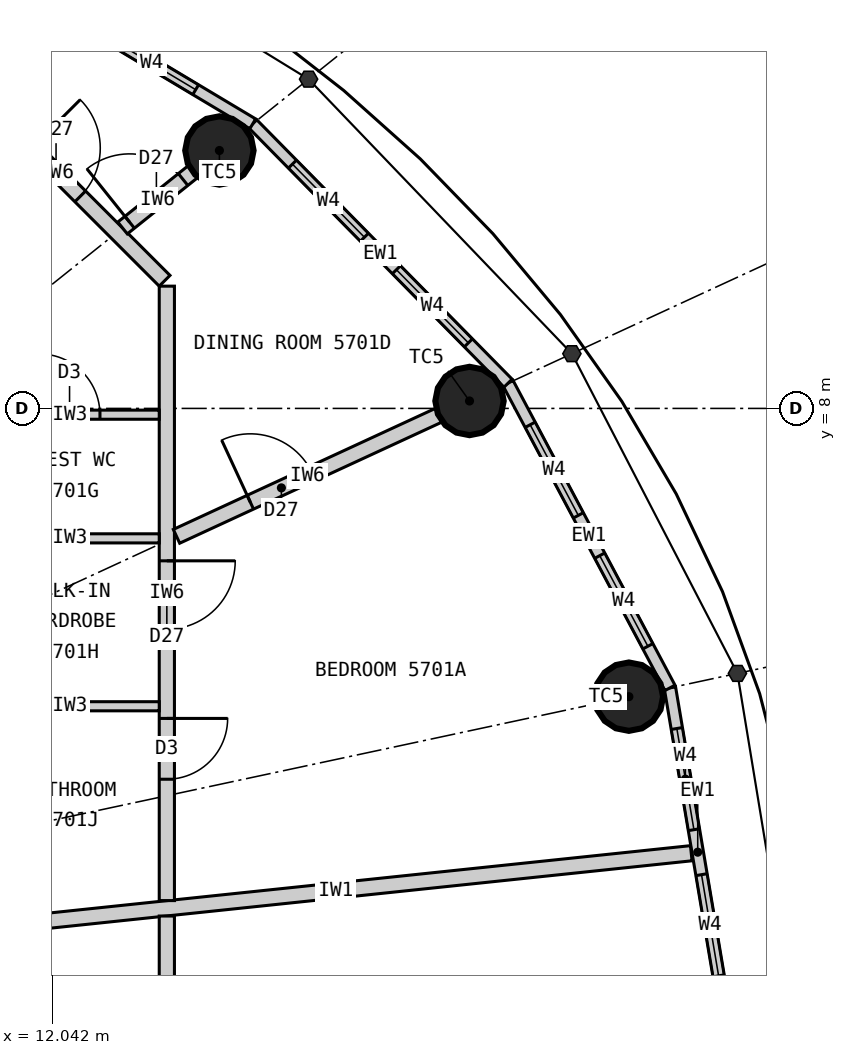
"""IFC4 building model, lengths in metres.
Left out: names, types, materials, properties, quantities, classifications, styles, units other than length and angle.
Written with IfcOpenShell. Run it as: python <this file> out.ifc"""

import sys

from ifc_helpers import new_model, si_unit, direction, frame, frame_2d, origin, origin_2d, place, context, subcontext, project, spatial, rectangle, circle, extrude, element, fill, save


model = new_model("IFC4")
c1 = context("Model", 3, precision=1e-05, world=origin(), true_north=direction((0.0, 1.0)))
c2 = subcontext(c1, "Body", "Model", "MODEL_VIEW")
j1 = project(units=[si_unit("LENGTHUNIT", "METRE"), si_unit("PLANEANGLEUNIT", "RADIAN")], contexts=[c1])
p1 = place(None, origin())
s1 = spatial("IfcSite", under=j1, at=p1, CompositionType="ELEMENT")
p2 = place(p1, origin())
s2 = spatial("IfcBuilding", under=s1, at=p2, CompositionType="ELEMENT")
p3 = place(p2, frame((0.0, 0.0, 212.7)))
s3 = spatial("IfcBuildingStorey", under=s2, at=p3, CompositionType="ELEMENT", Elevation=212.7)
for number, where, z_axis, x_axis in (
    (1, (19.629, 4.208, 0.0), (0.0, 0.0, 1.0), (1.0, 0.0, 0.0)),
    (2, (17.532, 8.098, 0.0), (0.0, 0.0, 1.0), (1.0, 0.0, 0.0)),
    (3, (14.241, 11.393, 0.0), (0.0, 0.0, 1.0), (1.0, 0.0, 0.0)),
):
    element("IfcColumn", number, at=place(p3, frame(where, z_axis=z_axis, x_axis=x_axis)), inside=s3, PredefinedType="COLUMN", context=c2, shape_type="SweptSolid", body=[
        extrude(circle(Radius=0.45, at=origin_2d()), origin(), (0.0, 0.0, 1.0), 3.3),
    ])
p4 = place(p3, frame((20.9, 0.0, 0.0), z_axis=(0.0, 0.0, 1.0), x_axis=(-0.166538513568, 0.986034950445, 0.0)))
e4 = element("IfcWall", 4, at=p4, inside=s3, PredefinedType="ELEMENTEDWALL", context=c2, shape_type="SweptSolid", body=[
    extrude(rectangle(XDim=4.385, YDim=0.15, at=frame_2d((2.192, 0.0))), origin(), (0.0, 0.0, 1.0), 3.12),
])
p5 = place(p4, frame((0.542, 0.0, 0.9)))
e5 = element("IfcOpeningElement", 5, at=p5, cuts=e4, PredefinedType="OPENING", context=c2, shape_type="SweptSolid", body=[
    extrude(rectangle(XDim=1.35, YDim=1.9, at=frame_2d((0.675, 0.95))), frame((0.0, 0.085, 0.0), z_axis=(0.0, -1.0, 0.0), x_axis=(1.0, 0.0, 0.0)), (0.0, 0.0, 1.0), 0.17),
])
p6 = place(p4, frame((2.492, 0.0, 0.9)))
e6 = element("IfcOpeningElement", 6, at=p6, cuts=e4, PredefinedType="OPENING", context=c2, shape_type="SweptSolid", body=[
    extrude(rectangle(XDim=1.35, YDim=1.9, at=frame_2d((0.675, 0.95))), frame((0.0, 0.085, 0.0), z_axis=(0.0, -1.0, 0.0), x_axis=(1.0, 0.0, 0.0)), (0.0, 0.0, 1.0), 0.17),
])
p7 = place(p3, frame((20.17, 4.323, 0.0), z_axis=(0.0, 0.0, 1.0), x_axis=(-0.469256152955, 0.883062094597, 0.0)))
e7 = element("IfcWall", 7, at=p7, inside=s3, PredefinedType="ELEMENTEDWALL", context=c2, shape_type="SweptSolid", body=[
    extrude(rectangle(XDim=4.539, YDim=0.15, at=frame_2d((2.27, 0.0))), origin(), (0.0, 0.0, 1.0), 3.12),
])
p8 = place(p7, frame((0.62, 0.0, 0.9)))
e8 = element("IfcOpeningElement", 8, at=p8, cuts=e7, PredefinedType="OPENING", context=c2, shape_type="SweptSolid", body=[
    extrude(rectangle(XDim=1.35, YDim=1.9, at=frame_2d((0.675, 0.95))), frame((0.0, 0.085, 0.0), z_axis=(0.0, -1.0, 0.0), x_axis=(1.0, 0.0, 0.0)), (0.0, 0.0, 1.0), 0.17),
])
p9 = place(p7, frame((2.57, 0.0, 0.9)))
e9 = element("IfcOpeningElement", 9, at=p9, cuts=e7, PredefinedType="OPENING", context=c2, shape_type="SweptSolid", body=[
    extrude(rectangle(XDim=1.35, YDim=1.9, at=frame_2d((0.675, 0.95))), frame((0.0, 0.085, 0.0), z_axis=(0.0, -1.0, 0.0), x_axis=(1.0, 0.0, 0.0)), (0.0, 0.0, 1.0), 0.17),
])
p10 = place(p3, frame((18.04, 8.332, 0.0), z_axis=(0.0, 0.0, 1.0), x_axis=(-0.701527379618, 0.712642501993, 0.0)))
e10 = element("IfcWall", 10, at=p10, inside=s3, PredefinedType="ELEMENTEDWALL", context=c2, shape_type="SweptSolid", body=[
    extrude(rectangle(XDim=4.788, YDim=0.15, at=frame_2d((2.394, 0.0))), origin(), (0.0, 0.0, 1.0), 3.12),
])
p11 = place(p10, frame((0.744, 0.0, 0.9)))
e11 = element("IfcOpeningElement", 11, at=p11, cuts=e10, PredefinedType="OPENING", context=c2, shape_type="SweptSolid", body=[
    extrude(rectangle(XDim=1.35, YDim=1.9, at=frame_2d((0.675, 0.95))), frame((0.0, 0.085, 0.0), z_axis=(0.0, -1.0, 0.0), x_axis=(1.0, 0.0, 0.0)), (0.0, 0.0, 1.0), 0.17),
])
p12 = place(p10, frame((2.694, 0.0, 0.9)))
e12 = element("IfcOpeningElement", 12, at=p12, cuts=e10, PredefinedType="OPENING", context=c2, shape_type="SweptSolid", body=[
    extrude(rectangle(XDim=1.35, YDim=1.9, at=frame_2d((0.675, 0.95))), frame((0.0, 0.085, 0.0), z_axis=(0.0, -1.0, 0.0), x_axis=(1.0, 0.0, 0.0)), (0.0, 0.0, 1.0), 0.17),
])
p13 = place(p3, frame((14.68, 11.744, 0.0), z_axis=(0.0, 0.0, 1.0), x_axis=(-0.85822150553, 0.513279502265, 0.0)))
e13 = element("IfcWall", 13, at=p13, inside=s3, PredefinedType="ELEMENTEDWALL", context=c2, shape_type="SweptSolid", body=[
    extrude(rectangle(XDim=5.05, YDim=0.15, at=frame_2d((2.525, 0.0))), origin(), (0.0, 0.0, 1.0), 3.12),
])
p14 = place(p13, frame((0.875, 0.0, 0.9)))
e14 = element("IfcOpeningElement", 14, at=p14, cuts=e13, PredefinedType="OPENING", context=c2, shape_type="SweptSolid", body=[
    extrude(rectangle(XDim=1.35, YDim=1.9, at=frame_2d((0.675, 0.95))), frame((0.0, 0.085, 0.0), z_axis=(0.0, -1.0, 0.0), x_axis=(1.0, 0.0, 0.0)), (0.0, 0.0, 1.0), 0.17),
])
p15 = place(p13, frame((2.825, 0.0, 0.9)))
e15 = element("IfcOpeningElement", 15, at=p15, cuts=e13, PredefinedType="OPENING", context=c2, shape_type="SweptSolid", body=[
    extrude(rectangle(XDim=1.35, YDim=1.9, at=frame_2d((0.675, 0.95))), frame((0.0, 0.085, 0.0), z_axis=(0.0, -1.0, 0.0), x_axis=(1.0, 0.0, 0.0)), (0.0, 0.0, 1.0), 0.17),
])
p16 = place(p3, frame((11.1, 1.166, 0.0), z_axis=(0.0, 0.0, 1.0), x_axis=(0.994527487125, 0.104475247564, 0.0)))
e16 = element("IfcWall", 16, at=p16, inside=s3, PredefinedType="PARTITIONING", context=c2, shape_type="SweptSolid", body=[
    extrude(rectangle(XDim=9.401, YDim=0.2, at=frame_2d((4.701, 0.0))), origin(), (0.0, 0.0, 1.0), 2.47),
])
p17 = place(p3, frame((13.55, 1.525, 0.0), z_axis=(0.0, 0.0, 1.0), x_axis=(0.0, 1.0, 0.0)))
e17 = element("IfcWall", 17, at=p17, inside=s3, PredefinedType="PARTITIONING", context=c2, shape_type="SweptSolid", body=[
    extrude(rectangle(XDim=8.084, YDim=0.2, at=frame_2d((4.042, 0.0))), origin(), (0.0, 0.0, 1.0), 3.12),
])
p18 = place(p17, frame((1.597, 0.0, 0.0)))
e18 = element("IfcOpeningElement", 18, at=p18, cuts=e17, PredefinedType="OPENING", context=c2, shape_type="SweptSolid", body=[
    extrude(rectangle(XDim=0.8, YDim=2.1, at=frame_2d((0.4, 1.05))), frame((0.0, 0.11, 0.0), z_axis=(0.0, -1.0, 0.0), x_axis=(1.0, 0.0, 0.0)), (0.0, 0.0, 1.0), 0.22),
])
p19 = place(p17, frame((3.57, 0.0, 0.0)))
e19 = element("IfcOpeningElement", 19, at=p19, cuts=e17, PredefinedType="OPENING", context=c2, shape_type="SweptSolid", body=[
    extrude(rectangle(XDim=0.9, YDim=2.1, at=frame_2d((0.45, 1.05))), frame((0.0, 0.11, 0.0), z_axis=(0.0, -1.0, 0.0), x_axis=(1.0, 0.0, 0.0)), (0.0, 0.0, 1.0), 0.22),
])
p20 = place(p3, frame((13.521, 9.679, 0.0), z_axis=(0.0, 0.0, 1.0), x_axis=(-0.707106781187, 0.707106781187, 0.0)))
e20 = element("IfcWall", 20, at=p20, inside=s3, PredefinedType="PARTITIONING", context=c2, shape_type="SweptSolid", body=[
    extrude(rectangle(XDim=4.019, YDim=0.2, at=frame_2d((2.009, 0.0))), origin(), (0.0, 0.0, 1.0), 3.12),
])
p21 = place(p20, frame((1.57, 0.0, 0.0)))
e21 = element("IfcOpeningElement", 21, at=p21, cuts=e20, PredefinedType="OPENING", context=c2, shape_type="SweptSolid", body=[
    extrude(rectangle(XDim=0.9, YDim=2.1, at=frame_2d((0.45, 1.05))), frame((0.0, 0.11, 0.0), z_axis=(0.0, -1.0, 0.0), x_axis=(1.0, 0.0, 0.0)), (0.0, 0.0, 1.0), 0.22),
])
p22 = place(p3, frame((13.677, 6.317, 0.0), z_axis=(0.0, 0.0, 1.0), x_axis=(0.907825704695, 0.419347695708, 0.0)))
e22 = element("IfcWall", 22, at=p22, inside=s3, PredefinedType="PARTITIONING", context=c2, shape_type="SweptSolid", body=[
    extrude(rectangle(XDim=3.796, YDim=0.2, at=frame_2d((1.898, 0.0))), origin(), (0.0, 0.0, 1.0), 2.32),
])
p23 = place(p22, frame((1.07, 0.0, 0.0)))
e23 = element("IfcOpeningElement", 23, at=p23, cuts=e22, PredefinedType="OPENING", context=c2, shape_type="SweptSolid", body=[
    extrude(rectangle(XDim=0.9, YDim=2.1, at=frame_2d((0.45, 1.05))), frame((0.0, 0.11, 0.0), z_axis=(0.0, -1.0, 0.0), x_axis=(1.0, 0.0, 0.0)), (0.0, 0.0, 1.0), 0.22),
])
p24 = place(p3, frame((12.968, 10.374, 0.0), z_axis=(0.0, 0.0, 1.0), x_axis=(0.780888968944, 0.624669847345, 0.0)))
e24 = element("IfcWall", 24, at=p24, inside=s3, PredefinedType="PARTITIONING", context=c2, shape_type="SweptSolid", body=[
    extrude(rectangle(XDim=1.181, YDim=0.2, at=frame_2d((0.591, 0.0))), origin(), (0.0, 0.0, 1.0), 2.42),
])
p25 = place(p24, frame((0.12, 0.0, 0.0)))
e25 = element("IfcOpeningElement", 25, at=p25, cuts=e24, PredefinedType="OPENING", context=c2, shape_type="SweptSolid", body=[
    extrude(rectangle(XDim=0.9, YDim=2.1, at=frame_2d((0.45, 1.05))), frame((0.0, 0.11, 0.0), z_axis=(0.0, -1.0, 0.0), x_axis=(1.0, 0.0, 0.0)), (0.0, 0.0, 1.0), 0.22),
])
for number, where, z_axis, x_axis in (
    (26, (11.1, 4.082, 0.0), (0.0, 0.0, 1.0), (1.0, 0.0, 0.0)),
    (27, (11.1, 6.29, 0.0), (0.0, 0.0, 1.0), (1.0, 0.0, 0.0)),
):
    element("IfcWall", number, at=place(p3, frame(where, z_axis=z_axis, x_axis=x_axis)), inside=s3, PredefinedType="PARTITIONING", context=c2, shape_type="SweptSolid", body=[
        extrude(rectangle(XDim=2.35, YDim=0.12, at=frame_2d((1.175, 0.0))), origin(), (0.0, 0.0, 1.0), 3.12),
    ])
p26 = place(p3, frame((11.1, 7.917, 0.0), z_axis=(0.0, 0.0, 1.0), x_axis=(1.0, 0.0, 0.0)))
e28 = element("IfcWall", 28, at=p26, inside=s3, PredefinedType="PARTITIONING", context=c2, shape_type="SweptSolid", body=[
    extrude(rectangle(XDim=2.35, YDim=0.12, at=frame_2d((1.175, 0.0))), origin(), (0.0, 0.0, 1.0), 3.12),
])
p27 = place(p26, frame((0.77, 0.0, 0.0)))
e29 = element("IfcOpeningElement", 29, at=p27, cuts=e28, PredefinedType="OPENING", context=c2, shape_type="SweptSolid", body=[
    extrude(rectangle(XDim=0.8, YDim=2.1, at=frame_2d((0.4, 1.05))), frame((0.0, 0.07, 0.0), z_axis=(0.0, -1.0, 0.0), x_axis=(1.0, 0.0, 0.0)), (0.0, 0.0, 1.0), 0.14),
])
p28 = place(p3, frame((13.55, -9.609, 0.0), z_axis=(0.0, 0.0, 1.0), x_axis=(0.0, 1.0, 0.0)))
e30 = element("IfcWall", 30, at=p28, inside=s3, PredefinedType="PARTITIONING", context=c2, shape_type="SweptSolid", body=[
    extrude(rectangle(XDim=10.93, YDim=0.2, at=frame_2d((5.465, 0.0))), origin(), (0.0, 0.0, 1.0), 3.12),
])
p29 = place(p28, frame((5.02, 0.0, 0.0)))
e31 = element("IfcOpeningElement", 31, at=p29, cuts=e30, PredefinedType="OPENING", context=c2, shape_type="SweptSolid", body=[
    extrude(rectangle(XDim=0.9, YDim=2.1, at=frame_2d((0.45, 1.05))), frame((0.0, 0.11, 0.0), z_axis=(0.0, -1.0, 0.0), x_axis=(1.0, 0.0, 0.0)), (0.0, 0.0, 1.0), 0.22),
])
p30 = place(p28, frame((6.877, 0.0, 0.0)))
e32 = element("IfcOpeningElement", 32, at=p30, cuts=e30, PredefinedType="OPENING", context=c2, shape_type="SweptSolid", body=[
    extrude(rectangle(XDim=0.9, YDim=2.1, at=frame_2d((0.45, 1.05))), frame((0.0, 0.11, 0.0), z_axis=(0.0, -1.0, 0.0), x_axis=(1.0, 0.0, 0.0)), (0.0, 0.0, 1.0), 0.22),
])
p31 = place(p28, frame((8.565, 0.0, 0.0)))
e33 = element("IfcOpeningElement", 33, at=p31, cuts=e30, PredefinedType="OPENING", context=c2, shape_type="SweptSolid", body=[
    extrude(rectangle(XDim=0.8, YDim=2.1, at=frame_2d((0.4, 1.05))), frame((0.0, 0.11, 0.0), z_axis=(0.0, -1.0, 0.0), x_axis=(1.0, 0.0, 0.0)), (0.0, 0.0, 1.0), 0.22),
])
p32 = place(p5, origin())
e34 = element("IfcWindow", 34, at=p32, inside=s3, PartitioningType="SINGLE_PANEL", PredefinedType="WINDOW", context=c2, shape_type="SweptSolid", body=[
    extrude(rectangle(XDim=1.35, YDim=1.9, at=frame_2d((0.675, 0.95))), frame((0.0, 0.03, 0.0), z_axis=(0.0, -1.0, 0.0), x_axis=(1.0, 0.0, 0.0)), (0.0, 0.0, 1.0), 0.06),
])
fill(e5, e34)
p33 = place(p6, origin())
e35 = element("IfcWindow", 35, at=p33, inside=s3, PartitioningType="SINGLE_PANEL", PredefinedType="WINDOW", context=c2, shape_type="SweptSolid", body=[
    extrude(rectangle(XDim=1.35, YDim=1.9, at=frame_2d((0.675, 0.95))), frame((0.0, 0.03, 0.0), z_axis=(0.0, -1.0, 0.0), x_axis=(1.0, 0.0, 0.0)), (0.0, 0.0, 1.0), 0.06),
])
fill(e6, e35)
p34 = place(p8, origin())
e36 = element("IfcWindow", 36, at=p34, inside=s3, PartitioningType="SINGLE_PANEL", PredefinedType="WINDOW", context=c2, shape_type="SweptSolid", body=[
    extrude(rectangle(XDim=1.35, YDim=1.9, at=frame_2d((0.675, 0.95))), frame((0.0, 0.03, 0.0), z_axis=(0.0, -1.0, 0.0), x_axis=(1.0, 0.0, 0.0)), (0.0, 0.0, 1.0), 0.06),
])
fill(e8, e36)
p35 = place(p9, origin())
e37 = element("IfcWindow", 37, at=p35, inside=s3, PartitioningType="SINGLE_PANEL", PredefinedType="WINDOW", context=c2, shape_type="SweptSolid", body=[
    extrude(rectangle(XDim=1.35, YDim=1.9, at=frame_2d((0.675, 0.95))), frame((0.0, 0.03, 0.0), z_axis=(0.0, -1.0, 0.0), x_axis=(1.0, 0.0, 0.0)), (0.0, 0.0, 1.0), 0.06),
])
fill(e9, e37)
p36 = place(p11, origin())
e38 = element("IfcWindow", 38, at=p36, inside=s3, PartitioningType="SINGLE_PANEL", PredefinedType="WINDOW", context=c2, shape_type="SweptSolid", body=[
    extrude(rectangle(XDim=1.35, YDim=1.9, at=frame_2d((0.675, 0.95))), frame((0.0, 0.03, 0.0), z_axis=(0.0, -1.0, 0.0), x_axis=(1.0, 0.0, 0.0)), (0.0, 0.0, 1.0), 0.06),
])
fill(e11, e38)
p37 = place(p12, origin())
e39 = element("IfcWindow", 39, at=p37, inside=s3, PartitioningType="SINGLE_PANEL", PredefinedType="WINDOW", context=c2, shape_type="SweptSolid", body=[
    extrude(rectangle(XDim=1.35, YDim=1.9, at=frame_2d((0.675, 0.95))), frame((0.0, 0.03, 0.0), z_axis=(0.0, -1.0, 0.0), x_axis=(1.0, 0.0, 0.0)), (0.0, 0.0, 1.0), 0.06),
])
fill(e12, e39)
p38 = place(p14, origin())
e40 = element("IfcWindow", 40, at=p38, inside=s3, PartitioningType="SINGLE_PANEL", PredefinedType="WINDOW", context=c2, shape_type="SweptSolid", body=[
    extrude(rectangle(XDim=1.35, YDim=1.9, at=frame_2d((0.675, 0.95))), frame((0.0, 0.03, 0.0), z_axis=(0.0, -1.0, 0.0), x_axis=(1.0, 0.0, 0.0)), (0.0, 0.0, 1.0), 0.06),
])
fill(e14, e40)
p39 = place(p18, origin())
e41 = element("IfcDoor", 41, at=p39, inside=s3, OperationType="SINGLE_SWING_RIGHT", PredefinedType="DOOR", context=c2, shape_type="SweptSolid", body=[
    extrude(rectangle(XDim=0.8, YDim=2.1, at=frame_2d((0.4, 1.05))), frame((0.0, 0.025, 0.0), z_axis=(0.0, -1.0, 0.0), x_axis=(1.0, 0.0, 0.0)), (0.0, 0.0, 1.0), 0.05),
])
fill(e18, e41)
p40 = place(p19, origin())
e42 = element("IfcDoor", 42, at=p40, inside=s3, OperationType="SINGLE_SWING_RIGHT", PredefinedType="DOOR", context=c2, shape_type="SweptSolid", body=[
    extrude(rectangle(XDim=0.9, YDim=2.1, at=frame_2d((0.45, 1.05))), frame((0.0, 0.025, 0.0), z_axis=(0.0, -1.0, 0.0), x_axis=(1.0, 0.0, 0.0)), (0.0, 0.0, 1.0), 0.05),
])
fill(e19, e42)
p41 = place(p27, origin())
e43 = element("IfcDoor", 43, at=p41, inside=s3, OperationType="SINGLE_SWING_LEFT", PredefinedType="DOOR", context=c2, shape_type="SweptSolid", body=[
    extrude(rectangle(XDim=0.8, YDim=2.1, at=frame_2d((0.4, 1.05))), frame((0.0, 0.025, 0.0), z_axis=(0.0, -1.0, 0.0), x_axis=(1.0, 0.0, 0.0)), (0.0, 0.0, 1.0), 0.05),
])
fill(e29, e43)
p42 = place(p21, origin())
e44 = element("IfcDoor", 44, at=p42, inside=s3, OperationType="SINGLE_SWING_RIGHT", PredefinedType="DOOR", context=c2, shape_type="SweptSolid", body=[
    extrude(rectangle(XDim=0.9, YDim=2.1, at=frame_2d((0.45, 1.05))), frame((0.0, 0.025, 0.0), z_axis=(0.0, -1.0, 0.0), x_axis=(1.0, 0.0, 0.0)), (0.0, 0.0, 1.0), 0.05),
])
fill(e21, e44)
p43 = place(p23, origin())
e45 = element("IfcDoor", 45, at=p43, inside=s3, OperationType="SINGLE_SWING_LEFT", PredefinedType="DOOR", context=c2, shape_type="SweptSolid", body=[
    extrude(rectangle(XDim=0.9, YDim=2.1, at=frame_2d((0.45, 1.05))), frame((0.0, 0.025, 0.0), z_axis=(0.0, -1.0, 0.0), x_axis=(1.0, 0.0, 0.0)), (0.0, 0.0, 1.0), 0.05),
])
fill(e23, e45)
p44 = place(p25, origin())
e46 = element("IfcDoor", 46, at=p44, inside=s3, OperationType="SINGLE_SWING_LEFT", PredefinedType="DOOR", context=c2, shape_type="SweptSolid", body=[
    extrude(rectangle(XDim=0.9, YDim=2.1, at=frame_2d((0.45, 1.05))), frame((0.0, 0.025, 0.0), z_axis=(0.0, -1.0, 0.0), x_axis=(1.0, 0.0, 0.0)), (0.0, 0.0, 1.0), 0.05),
])
fill(e25, e46)
save(model, sys.argv[1])
